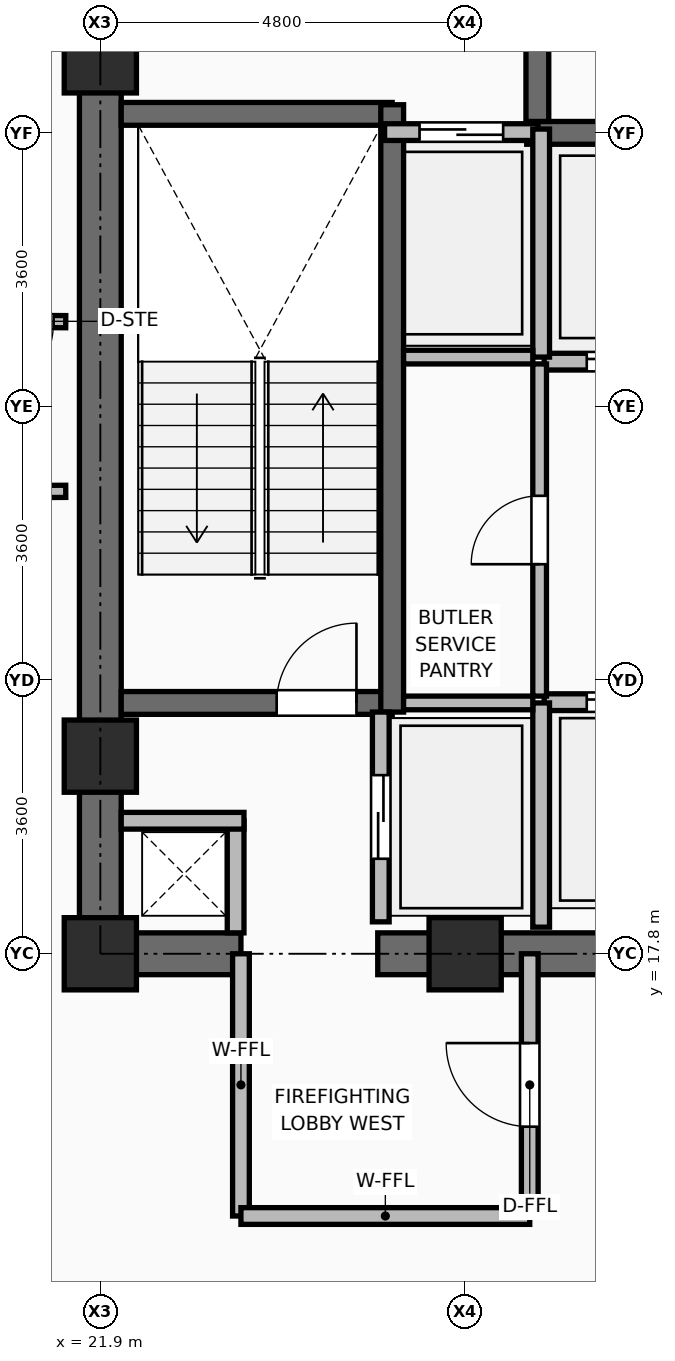
"""IFC4 building model, lengths in metres.
Left out: names, types, materials, properties, quantities, classifications, styles, units other than length and angle.
Written with IfcOpenShell. Run it as: python <this file> out.ifc"""

import sys

from ifc_helpers import new_model, si_unit, direction, frame, frame_2d, origin, origin_2d, place, context, subcontext, project, spatial, rectangle, extrude, element, fill, save


model = new_model("IFC4")
c1 = context("Model", 3, precision=1e-05, world=origin(), true_north=direction((0.0, 1.0)))
c2 = subcontext(c1, "Body", "Model", "MODEL_VIEW")
j1 = project(units=[si_unit("LENGTHUNIT", "METRE"), si_unit("PLANEANGLEUNIT", "RADIAN")], contexts=[c1])
p1 = place(None, origin())
s1 = spatial("IfcSite", under=j1, at=p1, CompositionType="ELEMENT")
p2 = place(p1, origin())
s2 = spatial("IfcBuilding", under=s1, at=p2, CompositionType="ELEMENT")
p3 = place(p2, frame((0.0, 0.0, 164.7)))
s3 = spatial("IfcBuildingStorey", under=s2, at=p3, CompositionType="ELEMENT", Elevation=164.7)
for number, where, z_axis, x_axis in (
    (1, (21.9, 17.8, 0.0), (0.0, 0.0, 1.0), (1.0, 0.0, 0.0)),
    (2, (26.7, 17.8, 0.0), (0.0, 0.0, 1.0), (1.0, 0.0, 0.0)),
    (3, (21.9, 20.4, 0.0), (0.0, 0.0, 1.0), (1.0, 0.0, 0.0)),
    (4, (21.9, 29.6, 0.0), (0.0, 0.0, 1.0), (1.0, 0.0, 0.0)),
):
    element("IfcColumn", number, at=place(p3, frame(where, z_axis=z_axis, x_axis=x_axis)), inside=s3, PredefinedType="COLUMN", context=c2, shape_type="SweptSolid", body=[
        extrude(rectangle(XDim=0.95, YDim=0.95, at=origin_2d()), origin(), (0.0, 0.0, 1.0), 3.75),
    ])
p4 = place(p3, frame((21.625, 17.8, 0.0), z_axis=(0.0, 0.0, 1.0), x_axis=(1.0, 0.0, 0.0)))
e5 = element("IfcWall", 5, at=p4, inside=s3, PredefinedType="SHEAR", context=c2, shape_type="SweptSolid", body=[
    extrude(rectangle(XDim=2.125, YDim=0.55, at=frame_2d((1.062, 0.0))), origin(), (0.0, 0.0, 1.0), 3.57),
])
p5 = place(p3, frame((25.55, 17.8, 0.0), z_axis=(0.0, 0.0, 1.0), x_axis=(1.0, 0.0, 0.0)))
e6 = element("IfcWall", 6, at=p5, inside=s3, PredefinedType="SHEAR", context=c2, shape_type="SweptSolid", body=[
    extrude(rectangle(XDim=6.9, YDim=0.55, at=frame_2d((3.45, 0.0))), origin(), (0.0, 0.0, 1.0), 3.57),
])
p6 = place(p3, frame((21.9, 18.075, 0.0), z_axis=(0.0, 0.0, 1.0), x_axis=(0.0, 1.0, 0.0)))
e7 = element("IfcWall", 7, at=p6, inside=s3, PredefinedType="SHEAR", context=c2, shape_type="SweptSolid", body=[
    extrude(rectangle(XDim=14.1, YDim=0.55, at=frame_2d((7.05, 0.0))), origin(), (0.0, 0.0, 1.0), 3.57),
])
p7 = place(p3, frame((22.175, 21.1, 0.0), z_axis=(0.0, 0.0, 1.0), x_axis=(1.0, 0.0, 0.0)))
e8 = element("IfcWall", 8, at=p7, inside=s3, PredefinedType="SHEAR", context=c2, shape_type="SweptSolid", body=[
    extrude(rectangle(XDim=3.565, YDim=0.3, at=frame_2d((1.782, 0.0))), origin(), (0.0, 0.0, 1.0), 3.57),
])
p8 = place(p7, frame((2.045, 0.0, 0.0)))
e9 = element("IfcOpeningElement", 9, at=p8, cuts=e8, PredefinedType="OPENING", context=c2, shape_type="SweptSolid", body=[
    extrude(rectangle(XDim=1.05, YDim=2.1, at=frame_2d((0.525, 1.05))), frame((0.0, 0.16, 0.0), z_axis=(0.0, -1.0, 0.0), x_axis=(1.0, 0.0, 0.0)), (0.0, 0.0, 1.0), 0.32),
])
p9 = place(p3, frame((22.175, 28.85, 0.0), z_axis=(0.0, 0.0, 1.0), x_axis=(1.0, 0.0, 0.0)))
e10 = element("IfcWall", 10, at=p9, inside=s3, PredefinedType="SHEAR", context=c2, shape_type="SweptSolid", body=[
    extrude(rectangle(XDim=3.565, YDim=0.3, at=frame_2d((1.782, 0.0))), origin(), (0.0, 0.0, 1.0), 3.57),
])
p10 = place(p3, frame((25.74, 20.98, 0.0), z_axis=(0.0, 0.0, 1.0), x_axis=(0.0, 1.0, 0.0)))
e11 = element("IfcWall", 11, at=p10, inside=s3, PredefinedType="SHEAR", context=c2, shape_type="SweptSolid", body=[
    extrude(rectangle(XDim=7.99, YDim=0.3, at=frame_2d((3.995, 0.0))), origin(), (0.0, 0.0, 1.0), 3.57),
])
p11 = place(p3, frame((27.51, 28.6, 0.0), z_axis=(0.0, 0.0, 1.0), x_axis=(1.0, 0.0, 0.0)))
e12 = element("IfcWall", 12, at=p11, inside=s3, PredefinedType="SHEAR", context=c2, shape_type="SweptSolid", body=[
    extrude(rectangle(XDim=8.03, YDim=0.3, at=frame_2d((4.015, 0.0))), origin(), (0.0, 0.0, 1.0), 3.57),
])
p12 = place(p3, frame((27.65, 28.75, 0.0), z_axis=(0.0, 0.0, 1.0), x_axis=(0.0, 1.0, 0.0)))
e13 = element("IfcWall", 13, at=p12, inside=s3, PredefinedType="SHEAR", context=c2, shape_type="SweptSolid", body=[
    extrude(rectangle(XDim=3.425, YDim=0.3, at=frame_2d((1.712, 0.0))), origin(), (0.0, 0.0, 1.0), 3.57),
])
p13 = place(p12, frame((1.0, 0.0, 0.0)))
e14 = element("IfcOpeningElement", 14, at=p13, cuts=e13, PredefinedType="OPENING", context=c2, shape_type="SweptSolid", body=[
    extrude(rectangle(XDim=1.05, YDim=2.1, at=frame_2d((0.525, 1.05))), frame((0.0, 0.16, 0.0), z_axis=(0.0, -1.0, 0.0), x_axis=(1.0, 0.0, 0.0)), (0.0, 0.0, 1.0), 0.32),
])
p14 = place(p3, frame((23.68, 18.075, 0.0), z_axis=(0.0, 0.0, 1.0), x_axis=(0.0, 1.0, 0.0)))
e15 = element("IfcWall", 15, at=p14, inside=s3, PredefinedType="PARTITIONING", context=c2, shape_type="SweptSolid", body=[
    extrude(rectangle(XDim=1.475, YDim=0.22, at=frame_2d((0.738, 0.0))), origin(), (0.0, 0.0, 1.0), 3.55),
])
p15 = place(p3, frame((22.175, 19.55, 0.0), z_axis=(0.0, 0.0, 1.0), x_axis=(1.0, 0.0, 0.0)))
e16 = element("IfcWall", 16, at=p15, inside=s3, PredefinedType="PARTITIONING", context=c2, shape_type="SweptSolid", body=[
    extrude(rectangle(XDim=1.615, YDim=0.22, at=frame_2d((0.808, 0.0))), origin(), (0.0, 0.0, 1.0), 2.595),
])
p16 = place(p3, frame((25.59, 18.22, 0.0), z_axis=(0.0, 0.0, 1.0), x_axis=(0.0, 1.0, 0.0)))
e17 = element("IfcWall", 17, at=p16, inside=s3, PredefinedType="PARTITIONING", context=c2, shape_type="SweptSolid", body=[
    extrude(rectangle(XDim=2.76, YDim=0.22, at=frame_2d((1.38, 0.0))), origin(), (0.0, 0.0, 1.0), 3.55),
])
p17 = place(p16, frame((0.83, 0.0, 0.0)))
e18 = element("IfcOpeningElement", 18, at=p17, cuts=e17, PredefinedType="OPENING", context=c2, shape_type="SweptSolid", body=[
    extrude(rectangle(XDim=1.1, YDim=2.2, at=frame_2d((0.55, 1.1))), frame((0.0, 0.12, 0.0), z_axis=(0.0, -1.0, 0.0), x_axis=(1.0, 0.0, 0.0)), (0.0, 0.0, 1.0), 0.24),
])
p18 = place(p3, frame((25.64, 28.61, 0.0), z_axis=(0.0, 0.0, 1.0), x_axis=(1.0, 0.0, 0.0)))
e19 = element("IfcWall", 19, at=p18, inside=s3, PredefinedType="PARTITIONING", context=c2, shape_type="SweptSolid", body=[
    extrude(rectangle(XDim=2.02, YDim=0.22, at=frame_2d((1.01, 0.0))), origin(), (0.0, 0.0, 1.0), 3.55),
])
p19 = place(p18, frame((0.46, 0.0, 0.0)))
e20 = element("IfcOpeningElement", 20, at=p19, cuts=e19, PredefinedType="OPENING", context=c2, shape_type="SweptSolid", body=[
    extrude(rectangle(XDim=1.1, YDim=2.2, at=frame_2d((0.55, 1.1))), frame((0.0, 0.12, 0.0), z_axis=(0.0, -1.0, 0.0), x_axis=(1.0, 0.0, 0.0)), (0.0, 0.0, 1.0), 0.24),
])
p20 = place(p3, frame((27.74, 21.11, 0.0), z_axis=(0.0, 0.0, 1.0), x_axis=(1.0, 0.0, 0.0)))
e21 = element("IfcWall", 21, at=p20, inside=s3, PredefinedType="PARTITIONING", context=c2, shape_type="SweptSolid", body=[
    extrude(rectangle(XDim=2.22, YDim=0.22, at=frame_2d((1.11, 0.0))), origin(), (0.0, 0.0, 1.0), 3.55),
])
p21 = place(p20, frame((0.56, 0.0, 0.0)))
e22 = element("IfcOpeningElement", 22, at=p21, cuts=e21, PredefinedType="OPENING", context=c2, shape_type="SweptSolid", body=[
    extrude(rectangle(XDim=1.1, YDim=2.2, at=frame_2d((0.55, 1.1))), frame((0.0, 0.12, 0.0), z_axis=(0.0, -1.0, 0.0), x_axis=(1.0, 0.0, 0.0)), (0.0, 0.0, 1.0), 0.24),
])
p22 = place(p3, frame((27.74, 25.59, 0.0), z_axis=(0.0, 0.0, 1.0), x_axis=(1.0, 0.0, 0.0)))
e23 = element("IfcWall", 23, at=p22, inside=s3, PredefinedType="PARTITIONING", context=c2, shape_type="SweptSolid", body=[
    extrude(rectangle(XDim=2.22, YDim=0.22, at=frame_2d((1.11, 0.0))), origin(), (0.0, 0.0, 1.0), 3.55),
])
p23 = place(p22, frame((0.56, 0.0, 0.0)))
e24 = element("IfcOpeningElement", 24, at=p23, cuts=e23, PredefinedType="OPENING", context=c2, shape_type="SweptSolid", body=[
    extrude(rectangle(XDim=1.1, YDim=2.2, at=frame_2d((0.55, 1.1))), frame((0.0, 0.12, 0.0), z_axis=(0.0, -1.0, 0.0), x_axis=(1.0, 0.0, 0.0)), (0.0, 0.0, 1.0), 0.24),
])
p24 = place(p3, frame((27.7, 18.15, 0.0), z_axis=(0.0, 0.0, 1.0), x_axis=(0.0, 1.0, 0.0)))
e25 = element("IfcWall", 25, at=p24, inside=s3, PredefinedType="PARTITIONING", context=c2, shape_type="SweptSolid", body=[
    extrude(rectangle(XDim=2.95, YDim=0.22, at=frame_2d((1.475, 0.0))), origin(), (0.0, 0.0, 1.0), 3.55),
])
p25 = place(p3, frame((27.7, 25.65, 0.0), z_axis=(0.0, 0.0, 1.0), x_axis=(0.0, 1.0, 0.0)))
e26 = element("IfcWall", 26, at=p25, inside=s3, PredefinedType="PARTITIONING", context=c2, shape_type="SweptSolid", body=[
    extrude(rectangle(XDim=3.0, YDim=0.22, at=frame_2d((1.5, 0.0))), origin(), (0.0, 0.0, 1.0), 3.55),
])
for number, where, z_axis, x_axis in (
    (27, (25.89, 21.1, 0.0), (0.0, 0.0, 1.0), (1.0, 0.0, 0.0)),
    (28, (25.89, 25.65, 0.0), (0.0, 0.0, 1.0), (1.0, 0.0, 0.0)),
):
    element("IfcWall", number, at=place(p3, frame(where, z_axis=z_axis, x_axis=x_axis)), inside=s3, PredefinedType="PARTITIONING", context=c2, shape_type="SweptSolid", body=[
        extrude(rectangle(XDim=1.7, YDim=0.18, at=frame_2d((0.85, 0.0))), origin(), (0.0, 0.0, 1.0), 3.55),
    ])
p26 = place(p3, frame((27.68, 21.19, 0.0), z_axis=(0.0, 0.0, 1.0), x_axis=(0.0, 1.0, 0.0)))
e29 = element("IfcWall", 29, at=p26, inside=s3, PredefinedType="PARTITIONING", context=c2, shape_type="SweptSolid", body=[
    extrude(rectangle(XDim=4.37, YDim=0.18, at=frame_2d((2.185, 0.0))), origin(), (0.0, 0.0, 1.0), 3.55),
])
p27 = place(p26, frame((1.735, 0.0, 0.0)))
e30 = element("IfcOpeningElement", 30, at=p27, cuts=e29, PredefinedType="OPENING", context=c2, shape_type="SweptSolid", body=[
    extrude(rectangle(XDim=0.9, YDim=2.1, at=frame_2d((0.45, 1.05))), frame((0.0, 0.1, 0.0), z_axis=(0.0, -1.0, 0.0), x_axis=(1.0, 0.0, 0.0)), (0.0, 0.0, 1.0), 0.2),
])
p28 = place(p3, frame((23.75, 14.35, 0.0), z_axis=(0.0, 0.0, 1.0), x_axis=(0.0, 1.0, 0.0)))
e31 = element("IfcWall", 31, at=p28, inside=s3, PredefinedType="PARTITIONING", context=c2, shape_type="SweptSolid", body=[
    extrude(rectangle(XDim=3.45, YDim=0.22, at=frame_2d((1.725, 0.0))), origin(), (0.0, 0.0, 1.0), 3.006),
])
p29 = place(p3, frame((23.75, 14.35, 0.0), z_axis=(0.0, 0.0, 1.0), x_axis=(1.0, 0.0, 0.0)))
e32 = element("IfcWall", 32, at=p29, inside=s3, PredefinedType="PARTITIONING", context=c2, shape_type="SweptSolid", body=[
    extrude(rectangle(XDim=3.8, YDim=0.22, at=frame_2d((1.9, 0.0))), origin(), (0.0, 0.0, 1.0), 3.55),
])
p30 = place(p3, frame((27.55, 14.35, 0.0), z_axis=(0.0, 0.0, 1.0), x_axis=(0.0, 1.0, 0.0)))
e33 = element("IfcWall", 33, at=p30, inside=s3, PredefinedType="PARTITIONING", context=c2, shape_type="SweptSolid", body=[
    extrude(rectangle(XDim=3.45, YDim=0.22, at=frame_2d((1.725, 0.0))), origin(), (0.0, 0.0, 1.0), 3.006),
])
p31 = place(p30, frame((1.175, 0.0, 0.0)))
e34 = element("IfcOpeningElement", 34, at=p31, cuts=e33, PredefinedType="OPENING", context=c2, shape_type="SweptSolid", body=[
    extrude(rectangle(XDim=1.1, YDim=2.1, at=frame_2d((0.55, 1.05))), frame((0.0, 0.12, 0.0), z_axis=(0.0, -1.0, 0.0), x_axis=(1.0, 0.0, 0.0)), (0.0, 0.0, 1.0), 0.24),
])
p32 = place(p3, frame((21.445, 26.116, 0.0), z_axis=(0.0, 0.0, 1.0), x_axis=(-0.99998212632, 0.005978882852, 0.0)))
e35 = element("IfcWall", 35, at=p32, inside=s3, PredefinedType="PARTITIONING", context=c2, shape_type="SweptSolid", body=[
    extrude(rectangle(XDim=4.369, YDim=0.16, at=frame_2d((2.185, 0.0))), origin(), (0.0, 0.0, 1.0), 2.595),
])
p33 = place(p32, frame((0.16, 0.0, 0.0)))
e36 = element("IfcOpeningElement", 36, at=p33, cuts=e35, PredefinedType="OPENING", context=c2, shape_type="SweptSolid", body=[
    extrude(rectangle(XDim=1.2, YDim=2.1, at=frame_2d((0.6, 1.05))), frame((0.0, 0.09, 0.0), z_axis=(0.0, -1.0, 0.0), x_axis=(1.0, 0.0, 0.0)), (0.0, 0.0, 1.0), 0.18),
])
p34 = place(p3, frame((17.076, 23.858, 0.0), z_axis=(0.0, 0.0, 1.0), x_axis=(0.99998212632, 0.005978882852, 0.0)))
e37 = element("IfcWall", 37, at=p34, inside=s3, PredefinedType="PARTITIONING", context=c2, shape_type="SweptSolid", body=[
    extrude(rectangle(XDim=4.369, YDim=0.16, at=frame_2d((2.185, 0.0))), origin(), (0.0, 0.0, 1.0), 2.595),
])
p35 = place(p8, origin())
e38 = element("IfcDoor", 38, at=p35, inside=s3, OperationType="SINGLE_SWING_RIGHT", PredefinedType="DOOR", context=c2, shape_type="SweptSolid", body=[
    extrude(rectangle(XDim=1.05, YDim=2.1, at=frame_2d((0.525, 1.05))), frame((0.0, 0.025, 0.0), z_axis=(0.0, -1.0, 0.0), x_axis=(1.0, 0.0, 0.0)), (0.0, 0.0, 1.0), 0.05),
])
fill(e9, e38)
p36 = place(p17, origin())
e39 = element("IfcDoor", 39, at=p36, inside=s3, OperationType="DOUBLE_DOOR_SLIDING", PredefinedType="DOOR", context=c2, shape_type="SweptSolid", body=[
    extrude(rectangle(XDim=1.1, YDim=2.2, at=frame_2d((0.55, 1.1))), frame((0.0, 0.025, 0.0), z_axis=(0.0, -1.0, 0.0), x_axis=(1.0, 0.0, 0.0)), (0.0, 0.0, 1.0), 0.05),
])
fill(e18, e39)
p37 = place(p19, origin())
e40 = element("IfcDoor", 40, at=p37, inside=s3, OperationType="DOUBLE_DOOR_SLIDING", PredefinedType="DOOR", context=c2, shape_type="SweptSolid", body=[
    extrude(rectangle(XDim=1.1, YDim=2.2, at=frame_2d((0.55, 1.1))), frame((0.0, 0.025, 0.0), z_axis=(0.0, -1.0, 0.0), x_axis=(1.0, 0.0, 0.0)), (0.0, 0.0, 1.0), 0.05),
])
fill(e20, e40)
p38 = place(p21, origin())
e41 = element("IfcDoor", 41, at=p38, inside=s3, OperationType="DOUBLE_DOOR_SLIDING", PredefinedType="DOOR", context=c2, shape_type="SweptSolid", body=[
    extrude(rectangle(XDim=1.1, YDim=2.2, at=frame_2d((0.55, 1.1))), frame((0.0, 0.025, 0.0), z_axis=(0.0, -1.0, 0.0), x_axis=(1.0, 0.0, 0.0)), (0.0, 0.0, 1.0), 0.05),
])
fill(e22, e41)
p39 = place(p23, frame((1.1, 0.0, 0.0), z_axis=(0.0, 0.0, 1.0), x_axis=(-1.0, 0.0, 0.0)))
e42 = element("IfcDoor", 42, at=p39, inside=s3, OperationType="DOUBLE_DOOR_SLIDING", PredefinedType="DOOR", context=c2, shape_type="SweptSolid", body=[
    extrude(rectangle(XDim=1.1, YDim=2.2, at=frame_2d((0.55, 1.1))), frame((0.0, 0.025, 0.0), z_axis=(0.0, -1.0, 0.0), x_axis=(1.0, 0.0, 0.0)), (0.0, 0.0, 1.0), 0.05),
])
fill(e24, e42)
p40 = place(p27, origin())
e43 = element("IfcDoor", 43, at=p40, inside=s3, OperationType="SINGLE_SWING_LEFT", PredefinedType="DOOR", context=c2, shape_type="SweptSolid", body=[
    extrude(rectangle(XDim=0.9, YDim=2.1, at=frame_2d((0.45, 1.05))), frame((0.0, 0.025, 0.0), z_axis=(0.0, -1.0, 0.0), x_axis=(1.0, 0.0, 0.0)), (0.0, 0.0, 1.0), 0.05),
])
fill(e30, e43)
p41 = place(p31, origin())
e44 = element("IfcDoor", 44, at=p41, inside=s3, OperationType="SINGLE_SWING_RIGHT", PredefinedType="DOOR", context=c2, shape_type="SweptSolid", body=[
    extrude(rectangle(XDim=1.1, YDim=2.1, at=frame_2d((0.55, 1.05))), frame((0.0, 0.025, 0.0), z_axis=(0.0, -1.0, 0.0), x_axis=(1.0, 0.0, 0.0)), (0.0, 0.0, 1.0), 0.05),
])
fill(e34, e44)
p42 = place(p33, origin())
e45 = element("IfcDoor", 45, at=p42, inside=s3, OperationType="SINGLE_SWING_RIGHT", PredefinedType="DOOR", context=c2, shape_type="SweptSolid", body=[
    extrude(rectangle(XDim=1.2, YDim=2.1, at=frame_2d((0.6, 1.05))), frame((0.0, 0.025, 0.0), z_axis=(0.0, -1.0, 0.0), x_axis=(1.0, 0.0, 0.0)), (0.0, 0.0, 1.0), 0.05),
])
fill(e36, e45)
save(model, sys.argv[1])
